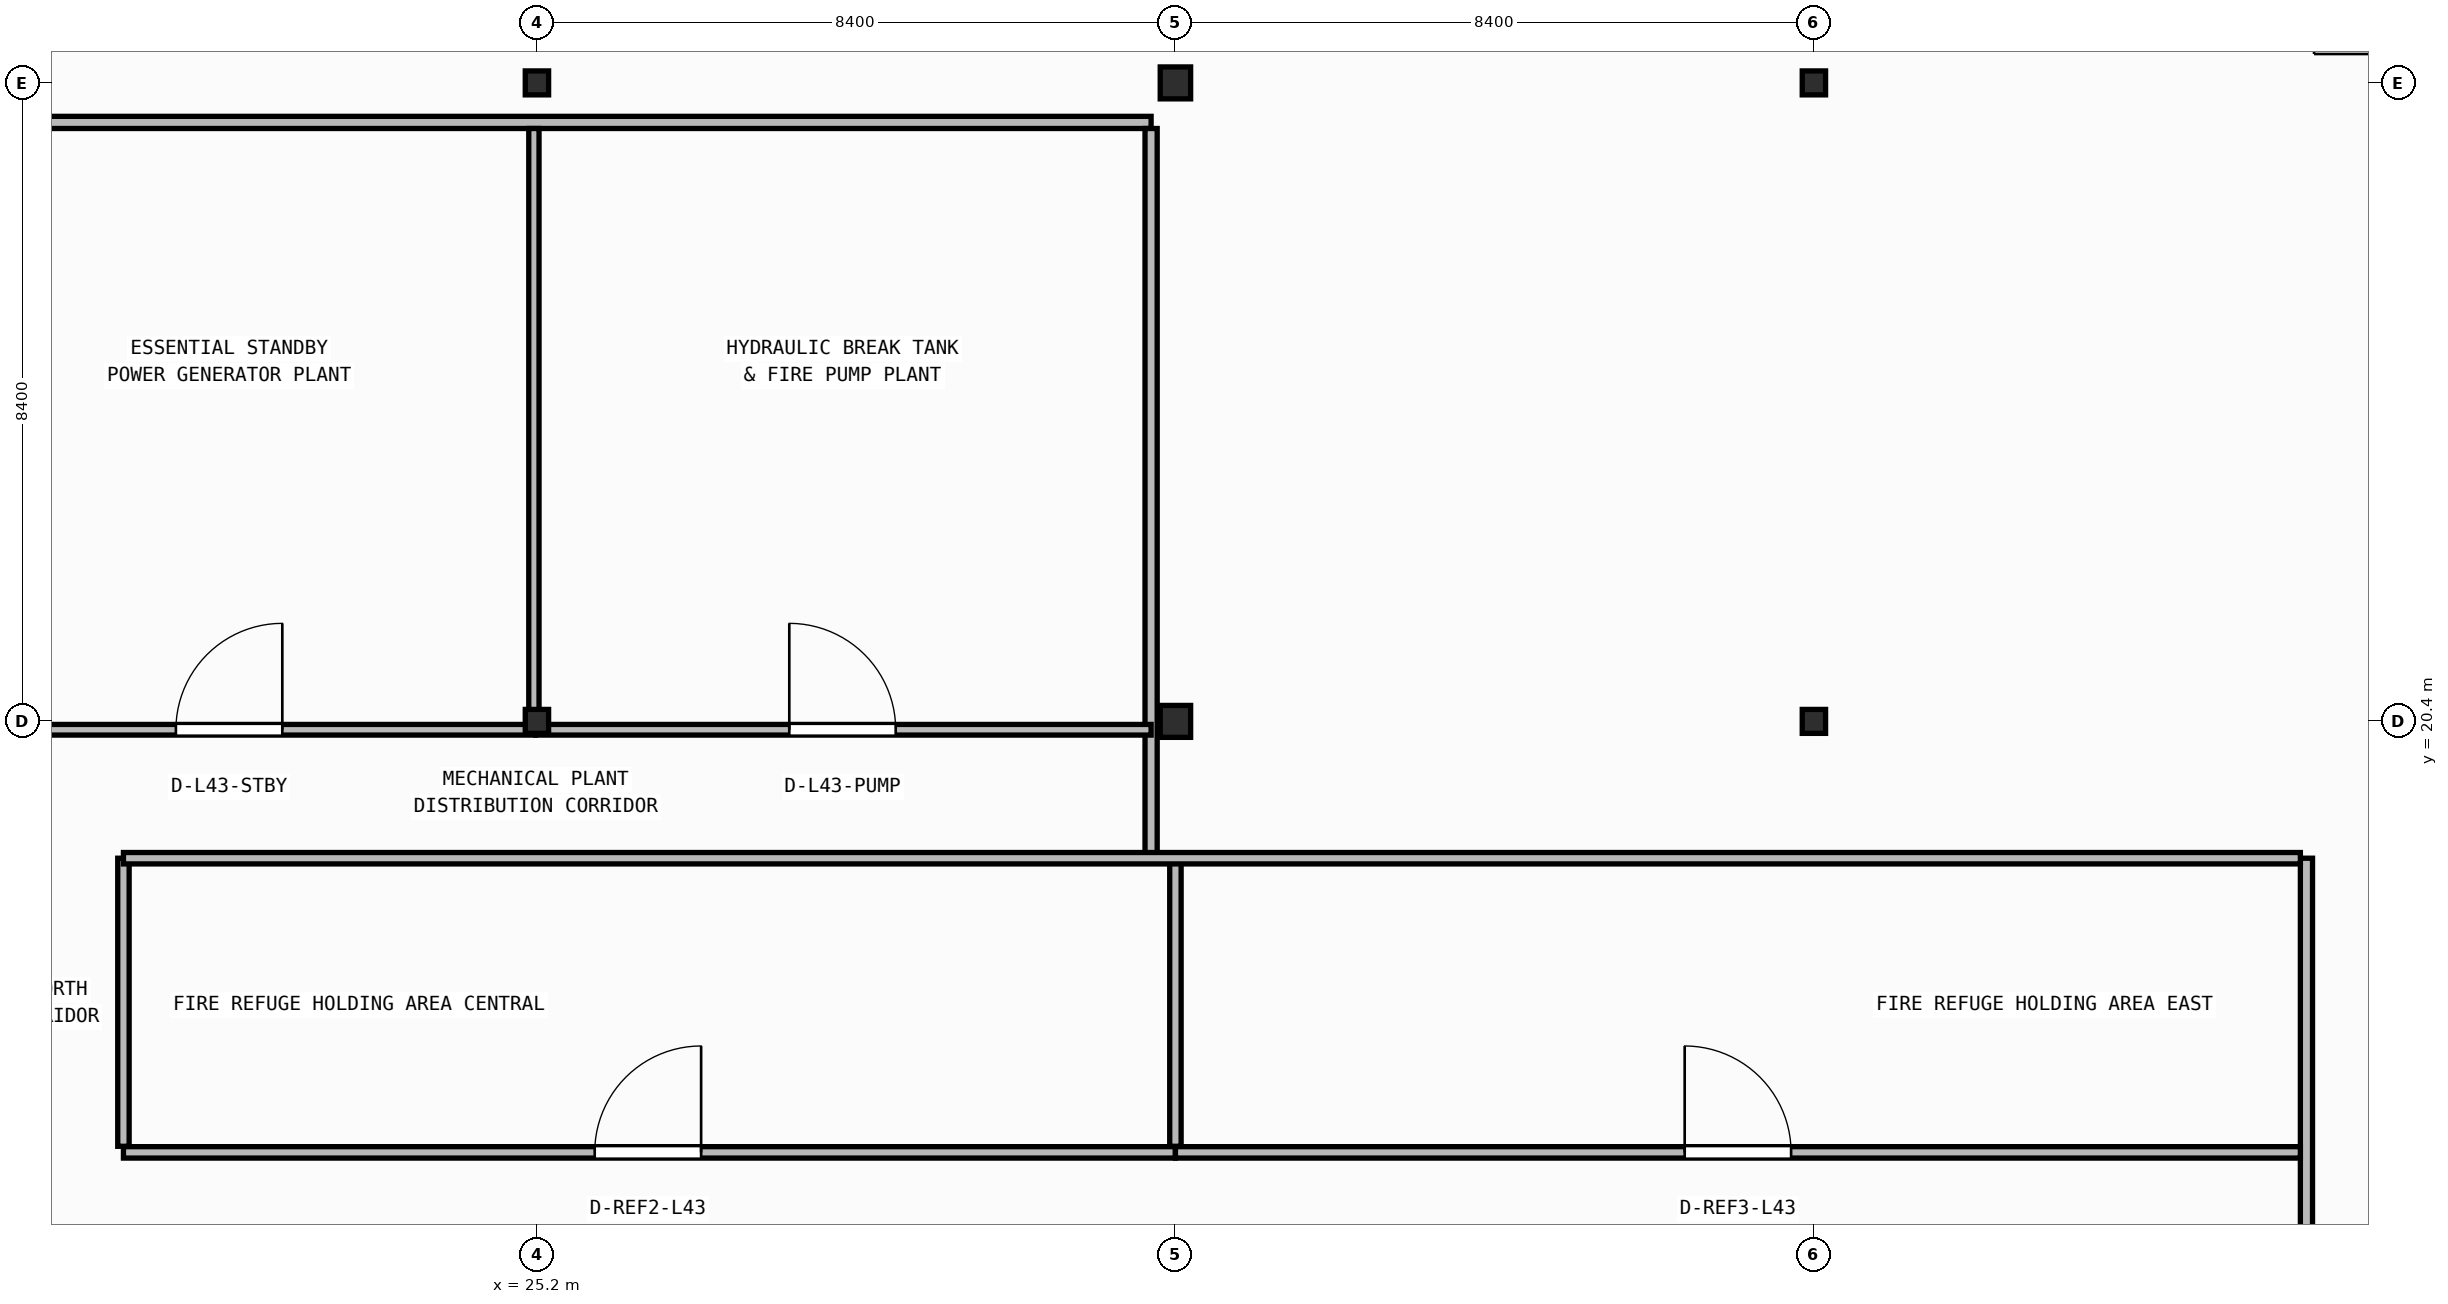
"""IFC4 building model, lengths in metres.
Left out: names, types, materials, properties, quantities, classifications, styles, units other than length and angle.
Written with IfcOpenShell. Run it as: python <this file> out.ifc"""

import sys

from ifc_helpers import new_model, si_unit, direction, frame, frame_2d, origin, origin_2d, place, context, subcontext, project, spatial, rectangle, i_section, extrude, element, fill, save


model = new_model("IFC4")
c1 = context("Model", 3, precision=1e-05, world=origin(), true_north=direction((0.0, 1.0)))
c2 = subcontext(c1, "Body", "Model", "MODEL_VIEW")
j1 = project(units=[si_unit("LENGTHUNIT", "METRE"), si_unit("PLANEANGLEUNIT", "RADIAN")], contexts=[c1])
p1 = place(None, origin())
s1 = spatial("IfcSite", under=j1, at=p1, CompositionType="ELEMENT")
p2 = place(p1, origin())
s2 = spatial("IfcBuilding", under=s1, at=p2, CompositionType="ELEMENT")
p3 = place(p2, frame((0.0, 0.0, 174.45)))
s3 = spatial("IfcBuildingStorey", under=s2, at=p3, CompositionType="ELEMENT", Elevation=174.45)
p4 = place(p3, frame((25.2, 20.4, 0.0), z_axis=(0.0, 0.0, 1.0), x_axis=(1.0, 0.0, 0.0)))
e1 = element("IfcColumn", 1, at=p4, inside=s3, PredefinedType="COLUMN", context=c2, shape_type="SweptSolid", body=[
    extrude(i_section(OverallWidth=0.307, OverallDepth=0.315, WebThickness=0.012, FlangeThickness=0.019, FilletRadius=0.017, at=origin_2d()), origin(), (0.0, 0.0, 1.0), 5.8),
])
p5 = place(p3, frame((33.6, 20.4, 0.0), z_axis=(0.0, 0.0, 1.0), x_axis=(1.0, 0.0, 0.0)))
e2 = element("IfcColumn", 2, at=p5, inside=s3, PredefinedType="COLUMN", context=c2, shape_type="SweptSolid", body=[
    extrude(i_section(OverallWidth=0.4, OverallDepth=0.42, WebThickness=0.025, FlangeThickness=0.04, at=origin_2d()), origin(), (0.0, 0.0, 1.0), 5.8),
])
for number, where, z_axis, x_axis in (
    (3, (42.0, 20.4, 0.0), (0.0, 0.0, 1.0), (1.0, 0.0, 0.0)),
    (4, (25.2, 28.8, 0.0), (0.0, 0.0, 1.0), (1.0, 0.0, 0.0)),
):
    element("IfcColumn", number, at=place(p3, frame(where, z_axis=z_axis, x_axis=x_axis)), inside=s3, PredefinedType="COLUMN", context=c2, shape_type="SweptSolid", body=[
        extrude(i_section(OverallWidth=0.307, OverallDepth=0.315, WebThickness=0.012, FlangeThickness=0.019, FilletRadius=0.017, at=origin_2d()), origin(), (0.0, 0.0, 1.0), 5.8),
    ])
p6 = place(p3, frame((33.6, 28.8, 0.0), z_axis=(0.0, 0.0, 1.0), x_axis=(1.0, 0.0, 0.0)))
e5 = element("IfcColumn", 5, at=p6, inside=s3, PredefinedType="COLUMN", context=c2, shape_type="SweptSolid", body=[
    extrude(i_section(OverallWidth=0.4, OverallDepth=0.42, WebThickness=0.025, FlangeThickness=0.04, at=origin_2d()), origin(), (0.0, 0.0, 1.0), 5.8),
])
p7 = place(p3, frame((42.0, 28.8, 0.0), z_axis=(0.0, 0.0, 1.0), x_axis=(1.0, 0.0, 0.0)))
e6 = element("IfcColumn", 6, at=p7, inside=s3, PredefinedType="COLUMN", context=c2, shape_type="SweptSolid", body=[
    extrude(i_section(OverallWidth=0.307, OverallDepth=0.315, WebThickness=0.012, FlangeThickness=0.019, FilletRadius=0.017, at=origin_2d()), origin(), (0.0, 0.0, 1.0), 5.8),
])
p8 = place(p3, frame((2.69, 28.28, 0.0), z_axis=(0.0, 0.0, 1.0), x_axis=(1.0, 0.0, 0.0)))
e7 = element("IfcWall", 7, at=p8, inside=s3, PredefinedType="PARTITIONING", context=c2, shape_type="SweptSolid", body=[
    extrude(rectangle(XDim=30.59, YDim=0.16, at=frame_2d((15.295, 0.0))), origin(), (0.0, 0.0, 1.0), 5.56),
])
p9 = place(p3, frame((33.28, 18.6, 0.0), z_axis=(0.0, 0.0, 1.0), x_axis=(0.0, 1.0, 0.0)))
e8 = element("IfcWall", 8, at=p9, inside=s3, PredefinedType="PARTITIONING", context=c2, shape_type="SweptSolid", body=[
    extrude(rectangle(XDim=9.6, YDim=0.16, at=frame_2d((4.8, 0.0))), origin(), (0.0, 0.0, 1.0), 4.325),
])
p10 = place(p3, frame((48.48, 12.16, 0.0), z_axis=(0.0, 0.0, 1.0), x_axis=(0.0, 1.0, 0.0)))
e9 = element("IfcWall", 9, at=p10, inside=s3, PredefinedType="PARTITIONING", context=c2, shape_type="SweptSolid", body=[
    extrude(rectangle(XDim=6.44, YDim=0.16, at=frame_2d((3.22, 0.0))), origin(), (0.0, 0.0, 1.0), 5.56),
])
p11 = place(p3, frame((19.76, 14.81, 0.0), z_axis=(0.0, 0.0, 1.0), x_axis=(0.0, 1.0, 0.0)))
e10 = element("IfcWall", 10, at=p11, inside=s3, PredefinedType="PARTITIONING", context=c2, shape_type="SweptSolid", body=[
    extrude(rectangle(XDim=3.79, YDim=0.15, at=frame_2d((1.895, 0.0))), origin(), (0.0, 0.0, 1.0), 5.56),
])
p12 = place(p3, frame((19.76, 14.73, 0.0), z_axis=(0.0, 0.0, 1.0), x_axis=(1.0, 0.0, 0.0)))
e11 = element("IfcWall", 11, at=p12, inside=s3, PredefinedType="PARTITIONING", context=c2, shape_type="SweptSolid", body=[
    extrude(rectangle(XDim=13.84, YDim=0.15, at=frame_2d((6.92, 0.0))), origin(), (0.0, 0.0, 1.0), 5.56),
])
p13 = place(p12, frame((6.2, 0.0, 0.0)))
e12 = element("IfcOpeningElement", 12, at=p13, cuts=e11, PredefinedType="OPENING", context=c2, shape_type="SweptSolid", body=[
    extrude(rectangle(XDim=1.4, YDim=2.15, at=frame_2d((0.7, 1.075))), frame((0.0, 0.085, 0.0), z_axis=(0.0, -1.0, 0.0), x_axis=(1.0, 0.0, 0.0)), (0.0, 0.0, 1.0), 0.17),
])
p14 = place(p3, frame((33.6, 14.81, 0.0), z_axis=(0.0, 0.0, 1.0), x_axis=(0.0, 1.0, 0.0)))
e13 = element("IfcWall", 13, at=p14, inside=s3, PredefinedType="PARTITIONING", context=c2, shape_type="SweptSolid", body=[
    extrude(rectangle(XDim=3.79, YDim=0.15, at=frame_2d((1.895, 0.0))), origin(), (0.0, 0.0, 1.0), 4.325),
])
p15 = place(p3, frame((33.6, 14.73, 0.0), z_axis=(0.0, 0.0, 1.0), x_axis=(1.0, 0.0, 0.0)))
e14 = element("IfcWall", 14, at=p15, inside=s3, PredefinedType="PARTITIONING", context=c2, shape_type="SweptSolid", body=[
    extrude(rectangle(XDim=14.8, YDim=0.15, at=frame_2d((7.4, 0.0))), origin(), (0.0, 0.0, 1.0), 5.56),
])
p16 = place(p15, frame((6.7, 0.0, 0.0)))
e15 = element("IfcOpeningElement", 15, at=p16, cuts=e14, PredefinedType="OPENING", context=c2, shape_type="SweptSolid", body=[
    extrude(rectangle(XDim=1.4, YDim=2.15, at=frame_2d((0.7, 1.075))), frame((0.0, 0.085, 0.0), z_axis=(0.0, -1.0, 0.0), x_axis=(1.0, 0.0, 0.0)), (0.0, 0.0, 1.0), 0.17),
])
p17 = place(p3, frame((19.76, 18.6, 0.0), z_axis=(0.0, 0.0, 1.0), x_axis=(1.0, 0.0, 0.0)))
e16 = element("IfcWall", 16, at=p17, inside=s3, PredefinedType="PARTITIONING", context=c2, shape_type="SweptSolid", body=[
    extrude(rectangle(XDim=28.64, YDim=0.15, at=frame_2d((14.32, 0.0))), origin(), (0.0, 0.0, 1.0), 5.56),
])
p18 = place(p3, frame((17.12, 20.29, 0.0), z_axis=(0.0, 0.0, 1.0), x_axis=(1.0, 0.0, 0.0)))
e17 = element("IfcWall", 17, at=p18, inside=s3, PredefinedType="PARTITIONING", context=c2, shape_type="SweptSolid", body=[
    extrude(rectangle(XDim=8.06, YDim=0.14, at=frame_2d((4.03, 0.0))), origin(), (0.0, 0.0, 1.0), 4.835),
])
p19 = place(p18, frame((3.33, 0.0, 0.0)))
e18 = element("IfcOpeningElement", 18, at=p19, cuts=e17, PredefinedType="OPENING", context=c2, shape_type="SweptSolid", body=[
    extrude(rectangle(XDim=1.4, YDim=2.15, at=frame_2d((0.7, 1.075))), frame((0.0, 0.08, 0.0), z_axis=(0.0, -1.0, 0.0), x_axis=(1.0, 0.0, 0.0)), (0.0, 0.0, 1.0), 0.16),
])
p20 = place(p3, frame((25.182, 20.29, 0.0), z_axis=(0.0, 0.0, 1.0), x_axis=(1.0, 0.0, 0.0)))
e19 = element("IfcWall", 19, at=p20, inside=s3, PredefinedType="PARTITIONING", context=c2, shape_type="SweptSolid", body=[
    extrude(rectangle(XDim=8.098, YDim=0.14, at=frame_2d((4.049, 0.0))), origin(), (0.0, 0.0, 1.0), 4.835),
])
p21 = place(p20, frame((3.338, 0.0, 0.0)))
e20 = element("IfcOpeningElement", 20, at=p21, cuts=e19, PredefinedType="OPENING", context=c2, shape_type="SweptSolid", body=[
    extrude(rectangle(XDim=1.4, YDim=2.15, at=frame_2d((0.7, 1.075))), frame((0.0, 0.08, 0.0), z_axis=(0.0, -1.0, 0.0), x_axis=(1.0, 0.0, 0.0)), (0.0, 0.0, 1.0), 0.16),
])
p22 = place(p3, frame((25.16, 20.36, 0.0), z_axis=(0.0, 0.0, 1.0), x_axis=(0.0, 1.0, 0.0)))
e21 = element("IfcWall", 21, at=p22, inside=s3, PredefinedType="PARTITIONING", context=c2, shape_type="SweptSolid", body=[
    extrude(rectangle(XDim=7.84, YDim=0.135, at=frame_2d((3.92, 0.0))), origin(), (0.0, 0.0, 1.0), 4.325),
])
p23 = place(p13, origin())
e22 = element("IfcDoor", 22, at=p23, inside=s3, OperationType="SINGLE_SWING_RIGHT", PredefinedType="DOOR", context=c2, shape_type="SweptSolid", body=[
    extrude(rectangle(XDim=1.4, YDim=2.15, at=frame_2d((0.7, 1.075))), frame((0.0, 0.025, 0.0), z_axis=(0.0, -1.0, 0.0), x_axis=(1.0, 0.0, 0.0)), (0.0, 0.0, 1.0), 0.05),
])
fill(e12, e22)
p24 = place(p16, origin())
e23 = element("IfcDoor", 23, at=p24, inside=s3, OperationType="SINGLE_SWING_LEFT", PredefinedType="DOOR", context=c2, shape_type="SweptSolid", body=[
    extrude(rectangle(XDim=1.4, YDim=2.15, at=frame_2d((0.7, 1.075))), frame((0.0, 0.025, 0.0), z_axis=(0.0, -1.0, 0.0), x_axis=(1.0, 0.0, 0.0)), (0.0, 0.0, 1.0), 0.05),
])
fill(e15, e23)
p25 = place(p19, origin())
e24 = element("IfcDoor", 24, at=p25, inside=s3, OperationType="SINGLE_SWING_RIGHT", PredefinedType="DOOR", context=c2, shape_type="SweptSolid", body=[
    extrude(rectangle(XDim=1.4, YDim=2.15, at=frame_2d((0.7, 1.075))), frame((0.0, 0.025, 0.0), z_axis=(0.0, -1.0, 0.0), x_axis=(1.0, 0.0, 0.0)), (0.0, 0.0, 1.0), 0.05),
])
fill(e18, e24)
p26 = place(p21, origin())
e25 = element("IfcDoor", 25, at=p26, inside=s3, OperationType="SINGLE_SWING_LEFT", PredefinedType="DOOR", context=c2, shape_type="SweptSolid", body=[
    extrude(rectangle(XDim=1.4, YDim=2.15, at=frame_2d((0.7, 1.075))), frame((0.0, 0.025, 0.0), z_axis=(0.0, -1.0, 0.0), x_axis=(1.0, 0.0, 0.0)), (0.0, 0.0, 1.0), 0.05),
])
fill(e20, e25)
save(model, sys.argv[1])
